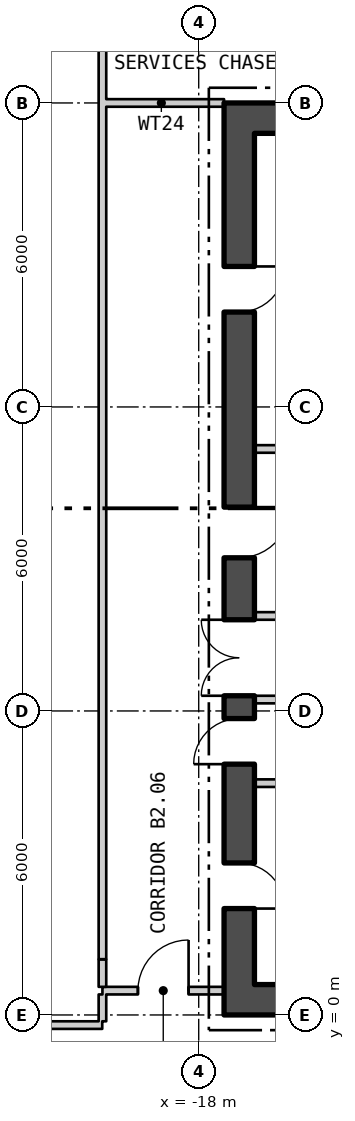
"""IFC4 building model, lengths in metres.
Left out: names, types, materials, properties, quantities, classifications, styles, units other than length and angle.
Written with IfcOpenShell. Run it as: python <this file> out.ifc"""

import sys

from ifc_helpers import new_model, si_unit, direction, frame, frame_2d, origin, place, context, subcontext, project, spatial, rectangle, extrude, element, fill, save


model = new_model("IFC4")
c1 = context("Model", 3, precision=1e-05, world=origin(), true_north=direction((0.0, 1.0)))
c2 = subcontext(c1, "Body", "Model", "MODEL_VIEW")
j1 = project(units=[si_unit("LENGTHUNIT", "METRE"), si_unit("PLANEANGLEUNIT", "RADIAN")], contexts=[c1])
p1 = place(None, origin())
s1 = spatial("IfcSite", under=j1, at=p1, CompositionType="ELEMENT")
p2 = place(p1, origin())
s2 = spatial("IfcBuilding", under=s1, at=p2, CompositionType="ELEMENT")
p3 = place(p2, frame((0.0, 0.0, -11.4)))
s3 = spatial("IfcBuildingStorey", under=s2, at=p3, CompositionType="ELEMENT", Elevation=-11.4)
p4 = place(p3, frame((-17.5, 0.3, 0.0), z_axis=(0.0, 0.0, 1.0), x_axis=(1.0, 0.0, 0.0)))
e1 = element("IfcWall", 1, at=p4, inside=s3, PredefinedType="SHEAR", context=c2, shape_type="SweptSolid", body=[
    extrude(rectangle(XDim=35.0, YDim=0.6, at=frame_2d((17.5, 0.0))), origin(), (0.0, 0.0, 1.0), 5.25),
])
p5 = place(p4, frame((12.0, 0.0, 0.0)))
e2 = element("IfcOpeningElement", 2, at=p5, cuts=e1, PredefinedType="OPENING", context=c2, shape_type="SweptSolid", body=[
    extrude(rectangle(XDim=1.8, YDim=2.4, at=frame_2d((0.9, 1.2))), frame((0.0, 0.31, 0.0), z_axis=(0.0, -1.0, 0.0), x_axis=(1.0, 0.0, 0.0)), (0.0, 0.0, 1.0), 0.62),
])
p6 = place(p4, frame((22.0, 0.0, 0.0)))
e3 = element("IfcOpeningElement", 3, at=p6, cuts=e1, PredefinedType="OPENING", context=c2, shape_type="SweptSolid", body=[
    extrude(rectangle(XDim=1.8, YDim=2.4, at=frame_2d((0.9, 1.2))), frame((0.0, 0.31, 0.0), z_axis=(0.0, -1.0, 0.0), x_axis=(1.0, 0.0, 0.0)), (0.0, 0.0, 1.0), 0.62),
])
p7 = place(p3, frame((-17.5, 17.7, 0.0), z_axis=(0.0, 0.0, 1.0), x_axis=(1.0, 0.0, 0.0)))
e4 = element("IfcWall", 4, at=p7, inside=s3, PredefinedType="SHEAR", context=c2, shape_type="SweptSolid", body=[
    extrude(rectangle(XDim=35.0, YDim=0.6, at=frame_2d((17.5, 0.0))), origin(), (0.0, 0.0, 1.0), 5.25),
])
p8 = place(p3, frame((-17.2, 0.6, 0.0), z_axis=(0.0, 0.0, 1.0), x_axis=(0.0, 1.0, 0.0)))
e5 = element("IfcWall", 5, at=p8, inside=s3, PredefinedType="SHEAR", context=c2, shape_type="SweptSolid", body=[
    extrude(rectangle(XDim=16.8, YDim=0.6, at=frame_2d((8.4, 0.0))), origin(), (0.0, 0.0, 1.0), 5.25),
])
p9 = place(p8, frame((5.7, 0.0, 0.0)))
e6 = element("IfcOpeningElement", 6, at=p9, cuts=e5, PredefinedType="OPENING", context=c2, shape_type="SweptSolid", body=[
    extrude(rectangle(XDim=1.5, YDim=2.1, at=frame_2d((0.75, 1.05))), frame((0.0, 0.31, 0.0), z_axis=(0.0, -1.0, 0.0), x_axis=(1.0, 0.0, 0.0)), (0.0, 0.0, 1.0), 0.62),
])
p10 = place(p8, frame((1.5, 0.0, 0.0)))
e7 = element("IfcOpeningElement", 7, at=p10, cuts=e5, PredefinedType="OPENING", context=c2, shape_type="SweptSolid", body=[
    extrude(rectangle(XDim=0.9, YDim=2.1, at=frame_2d((0.45, 1.05))), frame((0.0, 0.31, 0.0), z_axis=(0.0, -1.0, 0.0), x_axis=(1.0, 0.0, 0.0)), (0.0, 0.0, 1.0), 0.62),
])
p11 = place(p8, frame((4.35, 0.0, 0.0)))
e8 = element("IfcOpeningElement", 8, at=p11, cuts=e5, PredefinedType="OPENING", context=c2, shape_type="SweptSolid", body=[
    extrude(rectangle(XDim=0.9, YDim=2.1, at=frame_2d((0.45, 1.05))), frame((0.0, 0.31, 0.0), z_axis=(0.0, -1.0, 0.0), x_axis=(1.0, 0.0, 0.0)), (0.0, 0.0, 1.0), 0.62),
])
p12 = place(p8, frame((8.423, 0.0, 0.0)))
e9 = element("IfcOpeningElement", 9, at=p12, cuts=e5, PredefinedType="OPENING", context=c2, shape_type="SweptSolid", body=[
    extrude(rectangle(XDim=1.0, YDim=2.1, at=frame_2d((0.5, 1.05))), frame((0.0, 0.31, 0.0), z_axis=(0.0, -1.0, 0.0), x_axis=(1.0, 0.0, 0.0)), (0.0, 0.0, 1.0), 0.62),
])
p13 = place(p8, frame((13.273, 0.0, 0.0)))
e10 = element("IfcOpeningElement", 10, at=p13, cuts=e5, PredefinedType="OPENING", context=c2, shape_type="SweptSolid", body=[
    extrude(rectangle(XDim=0.9, YDim=2.1, at=frame_2d((0.45, 1.05))), frame((0.0, 0.31, 0.0), z_axis=(0.0, -1.0, 0.0), x_axis=(1.0, 0.0, 0.0)), (0.0, 0.0, 1.0), 0.62),
])
for number, where, z_axis, x_axis in (
    (11, (-16.9, 6.225, 0.0), (0.0, 0.0, 1.0), (1.0, 0.0, 0.0)),
    (12, (-16.9, 7.875, 0.0), (0.0, 0.0, 1.0), (1.0, 0.0, 0.0)),
    (13, (-16.9, 4.575, 0.0), (0.0, 0.0, 1.0), (1.0, 0.0, 0.0)),
    (14, (-16.9, 11.171, 0.0), (0.0, 0.0, 1.0), (1.0, 0.0, 0.0)),
):
    element("IfcWall", number, at=place(p3, frame(where, z_axis=z_axis, x_axis=x_axis)), inside=s3, PredefinedType="PARTITIONING", context=c2, shape_type="SweptSolid", body=[
        extrude(rectangle(XDim=2.4, YDim=0.15, at=frame_2d((1.2, 0.0))), origin(), (0.0, 0.0, 1.0), 5.25),
    ])
p14 = place(p3, frame((-26.75, -0.2, 0.0), z_axis=(0.0, 0.0, 1.0), x_axis=(1.0, 0.0, 0.0)))
e15 = element("IfcWall", 15, at=p14, inside=s3, PredefinedType="PARTITIONING", context=c2, shape_type="SweptSolid", body=[
    extrude(rectangle(XDim=6.846, YDim=0.15, at=frame_2d((3.423, 0.0))), origin(), (0.0, 0.0, 1.0), 5.25),
])
p15 = place(p14, frame((3.982, 0.0, 0.0)))
e16 = element("IfcOpeningElement", 16, at=p15, cuts=e15, PredefinedType="OPENING", context=c2, shape_type="SweptSolid", body=[
    extrude(rectangle(XDim=1.0, YDim=2.1, at=frame_2d((0.5, 1.05))), frame((0.0, 0.085, 0.0), z_axis=(0.0, -1.0, 0.0), x_axis=(1.0, 0.0, 0.0)), (0.0, 0.0, 1.0), 0.17),
])
p16 = place(p3, frame((-19.975, 18.0, 0.0), z_axis=(0.0, 0.0, 1.0), x_axis=(1.0, 0.0, 0.0)))
e17 = element("IfcWall", 17, at=p16, inside=s3, PredefinedType="PARTITIONING", context=c2, shape_type="SweptSolid", body=[
    extrude(rectangle(XDim=2.475, YDim=0.15, at=frame_2d((1.238, 0.0))), origin(), (0.0, 0.0, 1.0), 5.25),
])
p17 = place(p3, frame((-19.9, -0.125, 0.0), z_axis=(0.0, 0.0, 1.0), x_axis=(0.0, 1.0, 0.0)))
e18 = element("IfcWall", 18, at=p17, inside=s3, PredefinedType="PARTITIONING", context=c2, shape_type="SweptSolid", body=[
    extrude(rectangle(XDim=0.53, YDim=0.15, at=frame_2d((0.265, 0.0))), origin(), (0.0, 0.0, 1.0), 5.25),
])
p18 = place(p3, frame((-19.9, 0.48, 0.0), z_axis=(0.0, 0.0, 1.0), x_axis=(1.0, 0.0, 0.0)))
e19 = element("IfcWall", 19, at=p18, inside=s3, PredefinedType="PARTITIONING", context=c2, shape_type="SweptSolid", body=[
    extrude(rectangle(XDim=2.4, YDim=0.15, at=frame_2d((1.2, 0.0))), origin(), (0.0, 0.0, 1.0), 5.25),
])
p19 = place(p18, frame((0.7, 0.0, 0.0)))
e20 = element("IfcOpeningElement", 20, at=p19, cuts=e19, PredefinedType="OPENING", context=c2, shape_type="SweptSolid", body=[
    extrude(rectangle(XDim=1.0, YDim=2.1, at=frame_2d((0.5, 1.05))), frame((0.0, 0.085, 0.0), z_axis=(0.0, -1.0, 0.0), x_axis=(1.0, 0.0, 0.0)), (0.0, 0.0, 1.0), 0.17),
])
p20 = place(p3, frame((-19.9, 0.555, 0.0), z_axis=(0.0, 0.0, 1.0), x_axis=(0.0, 1.0, 0.0)))
e21 = element("IfcWall", 21, at=p20, inside=s3, PredefinedType="PARTITIONING", context=c2, shape_type="SweptSolid", body=[
    extrude(rectangle(XDim=0.541, YDim=0.15, at=frame_2d((0.271, 0.0))), origin(), (0.0, 0.0, 1.0), 5.25),
])
p21 = place(p3, frame((-19.9, 1.101, 0.0), z_axis=(0.0, 0.0, 1.0), x_axis=(0.0, 1.0, 0.0)))
e22 = element("IfcWall", 22, at=p21, inside=s3, PredefinedType="PARTITIONING", context=c2, shape_type="SweptSolid", body=[
    extrude(rectangle(XDim=16.824, YDim=0.15, at=frame_2d((8.412, 0.0))), origin(), (0.0, 0.0, 1.0), 5.25),
])
p22 = place(p3, frame((-19.9, 18.075, 0.0), z_axis=(0.0, 0.0, 1.0), x_axis=(0.0, 1.0, 0.0)))
e23 = element("IfcWall", 23, at=p22, inside=s3, PredefinedType="PARTITIONING", context=c2, shape_type="SweptSolid", body=[
    extrude(rectangle(XDim=1.675, YDim=0.15, at=frame_2d((0.838, 0.0))), origin(), (0.0, 0.0, 1.0), 5.25),
])
p23 = place(p9, origin())
e24 = element("IfcDoor", 24, at=p23, inside=s3, OperationType="DOUBLE_DOOR_SINGLE_SWING", PredefinedType="DOOR", context=c2, shape_type="SweptSolid", body=[
    extrude(rectangle(XDim=1.5, YDim=2.1, at=frame_2d((0.75, 1.05))), frame((0.0, 0.025, 0.0), z_axis=(0.0, -1.0, 0.0), x_axis=(1.0, 0.0, 0.0)), (0.0, 0.0, 1.0), 0.05),
])
fill(e6, e24)
p24 = place(p10, origin())
e25 = element("IfcDoor", 25, at=p24, inside=s3, OperationType="SINGLE_SWING_LEFT", PredefinedType="DOOR", context=c2, shape_type="SweptSolid", body=[
    extrude(rectangle(XDim=0.9, YDim=2.1, at=frame_2d((0.45, 1.05))), frame((0.0, 0.025, 0.0), z_axis=(0.0, -1.0, 0.0), x_axis=(1.0, 0.0, 0.0)), (0.0, 0.0, 1.0), 0.05),
])
fill(e7, e25)
p25 = place(p11, origin())
e26 = element("IfcDoor", 26, at=p25, inside=s3, OperationType="SINGLE_SWING_RIGHT", PredefinedType="DOOR", context=c2, shape_type="SweptSolid", body=[
    extrude(rectangle(XDim=0.9, YDim=2.1, at=frame_2d((0.45, 1.05))), frame((0.0, 0.025, 0.0), z_axis=(0.0, -1.0, 0.0), x_axis=(1.0, 0.0, 0.0)), (0.0, 0.0, 1.0), 0.05),
])
fill(e8, e26)
p26 = place(p12, origin())
e27 = element("IfcDoor", 27, at=p26, inside=s3, OperationType="SINGLE_SWING_RIGHT", PredefinedType="DOOR", context=c2, shape_type="SweptSolid", body=[
    extrude(rectangle(XDim=1.0, YDim=2.1, at=frame_2d((0.5, 1.05))), frame((0.0, 0.025, 0.0), z_axis=(0.0, -1.0, 0.0), x_axis=(1.0, 0.0, 0.0)), (0.0, 0.0, 1.0), 0.05),
])
fill(e9, e27)
p27 = place(p13, origin())
e28 = element("IfcDoor", 28, at=p27, inside=s3, OperationType="SINGLE_SWING_RIGHT", PredefinedType="DOOR", context=c2, shape_type="SweptSolid", body=[
    extrude(rectangle(XDim=0.9, YDim=2.1, at=frame_2d((0.45, 1.05))), frame((0.0, 0.025, 0.0), z_axis=(0.0, -1.0, 0.0), x_axis=(1.0, 0.0, 0.0)), (0.0, 0.0, 1.0), 0.05),
])
fill(e10, e28)
p28 = place(p19, origin())
e29 = element("IfcDoor", 29, at=p28, inside=s3, OperationType="SINGLE_SWING_LEFT", PredefinedType="DOOR", context=c2, shape_type="SweptSolid", body=[
    extrude(rectangle(XDim=1.0, YDim=2.1, at=frame_2d((0.5, 1.05))), frame((0.0, 0.025, 0.0), z_axis=(0.0, -1.0, 0.0), x_axis=(1.0, 0.0, 0.0)), (0.0, 0.0, 1.0), 0.05),
])
fill(e20, e29)
save(model, sys.argv[1])
